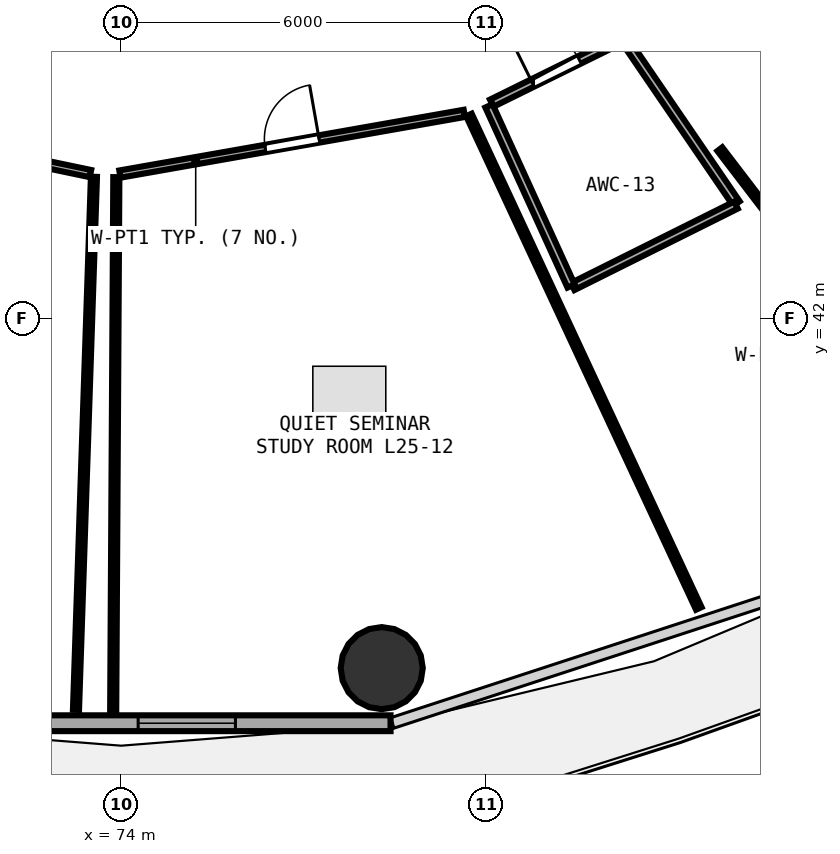
"""IFC4 building model, lengths in metres.
Left out: names, types, materials, properties, quantities, classifications, styles, units other than length and angle.
Written with IfcOpenShell. Run it as: python <this file> out.ifc"""

import sys

from ifc_helpers import new_model, si_unit, direction, frame, frame_2d, origin, origin_2d, place, context, subcontext, project, spatial, rectangle, circle, extrude, element, fill, save


model = new_model("IFC4")
c1 = context("Model", 3, precision=1e-05, world=origin(), true_north=direction((0.0, 1.0)))
c2 = subcontext(c1, "Body", "Model", "MODEL_VIEW")
j1 = project(units=[si_unit("LENGTHUNIT", "METRE"), si_unit("PLANEANGLEUNIT", "RADIAN")], contexts=[c1])
p1 = place(None, origin())
s1 = spatial("IfcSite", under=j1, at=p1, CompositionType="ELEMENT")
p2 = place(p1, origin())
s2 = spatial("IfcBuilding", under=s1, at=p2, CompositionType="ELEMENT")
p3 = place(p2, frame((0.0, 0.0, 98.85)))
s3 = spatial("IfcBuildingStorey", under=s2, at=p3, CompositionType="ELEMENT", Elevation=98.85)
p4 = place(p3, frame((78.286, 36.255, 0.0), z_axis=(0.0, 0.0, 1.0), x_axis=(1.0, 0.0, 0.0)))
e1 = element("IfcColumn", 1, at=p4, inside=s3, PredefinedType="COLUMN", context=c2, shape_type="SweptSolid", body=[
    extrude(circle(Radius=0.675, at=origin_2d()), origin(), (0.0, 0.0, 1.0), 3.75),
])
p5 = place(p3, frame((69.57, 35.349, 0.0), z_axis=(0.0, 0.0, 1.0), x_axis=(1.0, 0.0, 0.0)))
e2 = element("IfcWall", 2, at=p5, inside=s3, PredefinedType="SOLIDWALL", context=c2, shape_type="SweptSolid", body=[
    extrude(rectangle(XDim=8.861, YDim=0.26, at=frame_2d((4.43, 0.0))), origin(), (0.0, 0.0, 1.0), 3.475),
])
p6 = place(p5, frame((4.71, 0.0, 0.85)))
e3 = element("IfcOpeningElement", 3, at=p6, cuts=e2, PredefinedType="OPENING", context=c2, shape_type="SweptSolid", body=[
    extrude(rectangle(XDim=1.6, YDim=1.45, at=frame_2d((0.8, 0.725))), frame((0.0, 0.14, 0.0), z_axis=(0.0, -1.0, 0.0), x_axis=(1.0, 0.0, 0.0)), (0.0, 0.0, 1.0), 0.28),
])
p7 = place(p3, frame((67.874, 45.566, 0.0), z_axis=(0.0, 0.0, 1.0), x_axis=(0.978759890472, -0.205009943184, 0.0)))
e4 = element("IfcWall", 4, at=p7, inside=s3, PredefinedType="PARTITIONING", context=c2, shape_type="SweptSolid", body=[
    extrude(rectangle(XDim=5.744, YDim=0.12, at=frame_2d((2.872, 0.0))), origin(), (0.0, 0.0, 1.0), 3.235),
])
p8 = place(p7, frame((2.422, 0.0, 0.0)))
e5 = element("IfcOpeningElement", 5, at=p8, cuts=e4, PredefinedType="OPENING", context=c2, shape_type="SweptSolid", body=[
    extrude(rectangle(XDim=0.9, YDim=2.08, at=frame_2d((0.45, 1.04))), frame((0.0, 0.07, 0.0), z_axis=(0.0, -1.0, 0.0), x_axis=(1.0, 0.0, 0.0)), (0.0, 0.0, 1.0), 0.14),
])
p9 = place(p3, frame((73.98, 44.38, 0.0), z_axis=(0.0, 0.0, 1.0), x_axis=(0.984819435921, 0.17358190756, 0.0)))
e6 = element("IfcWall", 6, at=p9, inside=s3, PredefinedType="PARTITIONING", context=c2, shape_type="SweptSolid", body=[
    extrude(rectangle(XDim=5.751, YDim=0.12, at=frame_2d((2.875, 0.0))), origin(), (0.0, 0.0, 1.0), 3.235),
])
p10 = place(p9, frame((2.426, 0.0, 0.0)))
e7 = element("IfcOpeningElement", 7, at=p10, cuts=e6, PredefinedType="OPENING", context=c2, shape_type="SweptSolid", body=[
    extrude(rectangle(XDim=0.9, YDim=2.08, at=frame_2d((0.45, 1.04))), frame((0.0, 0.07, 0.0), z_axis=(0.0, -1.0, 0.0), x_axis=(1.0, 0.0, 0.0)), (0.0, 0.0, 1.0), 0.14),
])
p11 = place(p3, frame((80.095, 45.546, 0.0), z_axis=(0.0, 0.0, 1.0), x_axis=(0.897003770221, 0.442022891046, 0.0)))
e8 = element("IfcWall", 8, at=p11, inside=s3, PredefinedType="PLUMBINGWALL", context=c2, shape_type="SweptSolid", body=[
    extrude(rectangle(XDim=2.355, YDim=0.13, at=frame_2d((1.178, 0.0))), origin(), (0.0, 0.0, 1.0), 2.925),
])
p12 = place(p11, frame((0.747, 0.0, 0.0)))
e9 = element("IfcOpeningElement", 9, at=p12, cuts=e8, PredefinedType="OPENING", context=c2, shape_type="SweptSolid", body=[
    extrude(rectangle(XDim=0.86, YDim=2.05, at=frame_2d((0.43, 1.025))), frame((0.0, 0.075, 0.0), z_axis=(0.0, -1.0, 0.0), x_axis=(1.0, 0.0, 0.0)), (0.0, 0.0, 1.0), 0.15),
])
p13 = place(p3, frame((73.553, 44.336, 0.0), z_axis=(0.0, 0.0, 1.0), x_axis=(-0.033680921614, -0.999432636809, 0.0)))
e10 = element("IfcWall", 10, at=p13, inside=s3, PredefinedType="PARTITIONING", context=c2, shape_type="SweptSolid", body=[
    extrude(rectangle(XDim=8.771, YDim=0.1, at=frame_2d((4.385, 0.0))), origin(), (0.0, 0.0, 1.0), 2.975),
])
p14 = place(p3, frame((79.72, 45.353, 0.0), z_axis=(0.0, 0.0, 1.0), x_axis=(0.422225492456, -0.906490834769, 0.0)))
e11 = element("IfcWall", 11, at=p14, inside=s3, PredefinedType="PARTITIONING", context=c2, shape_type="SweptSolid", body=[
    extrude(rectangle(XDim=8.953, YDim=0.1, at=frame_2d((4.476, 0.0))), origin(), (0.0, 0.0, 1.0), 2.925),
])
p15 = place(p3, frame((73.869, 35.56, 0.0), z_axis=(0.0, 0.0, 1.0), x_axis=(0.005901573079, 0.999982585566, 0.0)))
e12 = element("IfcWall", 12, at=p15, inside=s3, PredefinedType="PARTITIONING", context=c2, shape_type="SweptSolid", body=[
    extrude(rectangle(XDim=8.77, YDim=0.1, at=frame_2d((4.385, 0.0))), origin(), (0.0, 0.0, 1.0), 2.975),
])
p16 = place(p3, frame((82.272, 46.597, 0.0), z_axis=(0.0, 0.0, 1.0), x_axis=(0.56421847533, -0.825625527764, 0.0)))
e13 = element("IfcWall", 13, at=p16, inside=s3, PredefinedType="PLUMBINGWALL", context=c2, shape_type="SweptSolid", body=[
    extrude(rectangle(XDim=3.272, YDim=0.13, at=frame_2d((1.636, 0.0))), origin(), (0.0, 0.0, 1.0), 3.235),
])
p17 = place(p3, frame((84.112, 43.87, 0.0), z_axis=(0.0, 0.0, 1.0), x_axis=(-0.89496337821, -0.446139610059, 0.0)))
e14 = element("IfcWall", 14, at=p17, inside=s3, PredefinedType="PLUMBINGWALL", context=c2, shape_type="SweptSolid", body=[
    extrude(rectangle(XDim=3.001, YDim=0.13, at=frame_2d((1.501, 0.0))), origin(), (0.0, 0.0, 1.0), 3.175),
])
p18 = place(p3, frame((81.4, 42.54, 0.0), z_axis=(0.0, 0.0, 1.0), x_axis=(-0.414882082756, 0.909875187819, 0.0)))
e15 = element("IfcWall", 15, at=p18, inside=s3, PredefinedType="PLUMBINGWALL", context=c2, shape_type="SweptSolid", body=[
    extrude(rectangle(XDim=3.255, YDim=0.13, at=frame_2d((1.627, 0.0))), origin(), (0.0, 0.0, 1.0), 2.925),
])
p19 = place(p3, frame((87.98, 39.383, 0.0), z_axis=(0.0, 0.0, 1.0), x_axis=(-0.607281003039, 0.794487119687, 0.0)))
e16 = element("IfcWall", 16, at=p19, inside=s3, PredefinedType="PARTITIONING", context=c2, shape_type="SweptSolid", body=[
    extrude(rectangle(XDim=6.806, YDim=0.1, at=frame_2d((3.403, 0.0))), origin(), (0.0, 0.0, 1.0), 2.925),
])
p20 = place(p6, origin())
e17 = element("IfcWindow", 17, at=p20, inside=s3, PartitioningType="SINGLE_PANEL", PredefinedType="WINDOW", context=c2, shape_type="SweptSolid", body=[
    extrude(rectangle(XDim=1.6, YDim=1.45, at=frame_2d((0.8, 0.725))), frame((0.0, 0.03, 0.0), z_axis=(0.0, -1.0, 0.0), x_axis=(1.0, 0.0, 0.0)), (0.0, 0.0, 1.0), 0.06),
])
fill(e3, e17)
p21 = place(p10, origin())
e18 = element("IfcDoor", 18, at=p21, inside=s3, OperationType="SINGLE_SWING_RIGHT", PredefinedType="DOOR", context=c2, shape_type="SweptSolid", body=[
    extrude(rectangle(XDim=0.9, YDim=2.08, at=frame_2d((0.45, 1.04))), frame((0.0, 0.025, 0.0), z_axis=(0.0, -1.0, 0.0), x_axis=(1.0, 0.0, 0.0)), (0.0, 0.0, 1.0), 0.05),
])
fill(e7, e18)
p22 = place(p12, origin())
e19 = element("IfcDoor", 19, at=p22, inside=s3, OperationType="SINGLE_SWING_LEFT", PredefinedType="DOOR", context=c2, shape_type="SweptSolid", body=[
    extrude(rectangle(XDim=0.86, YDim=2.05, at=frame_2d((0.43, 1.025))), frame((0.0, 0.025, 0.0), z_axis=(0.0, -1.0, 0.0), x_axis=(1.0, 0.0, 0.0)), (0.0, 0.0, 1.0), 0.05),
])
fill(e9, e19)
save(model, sys.argv[1])
